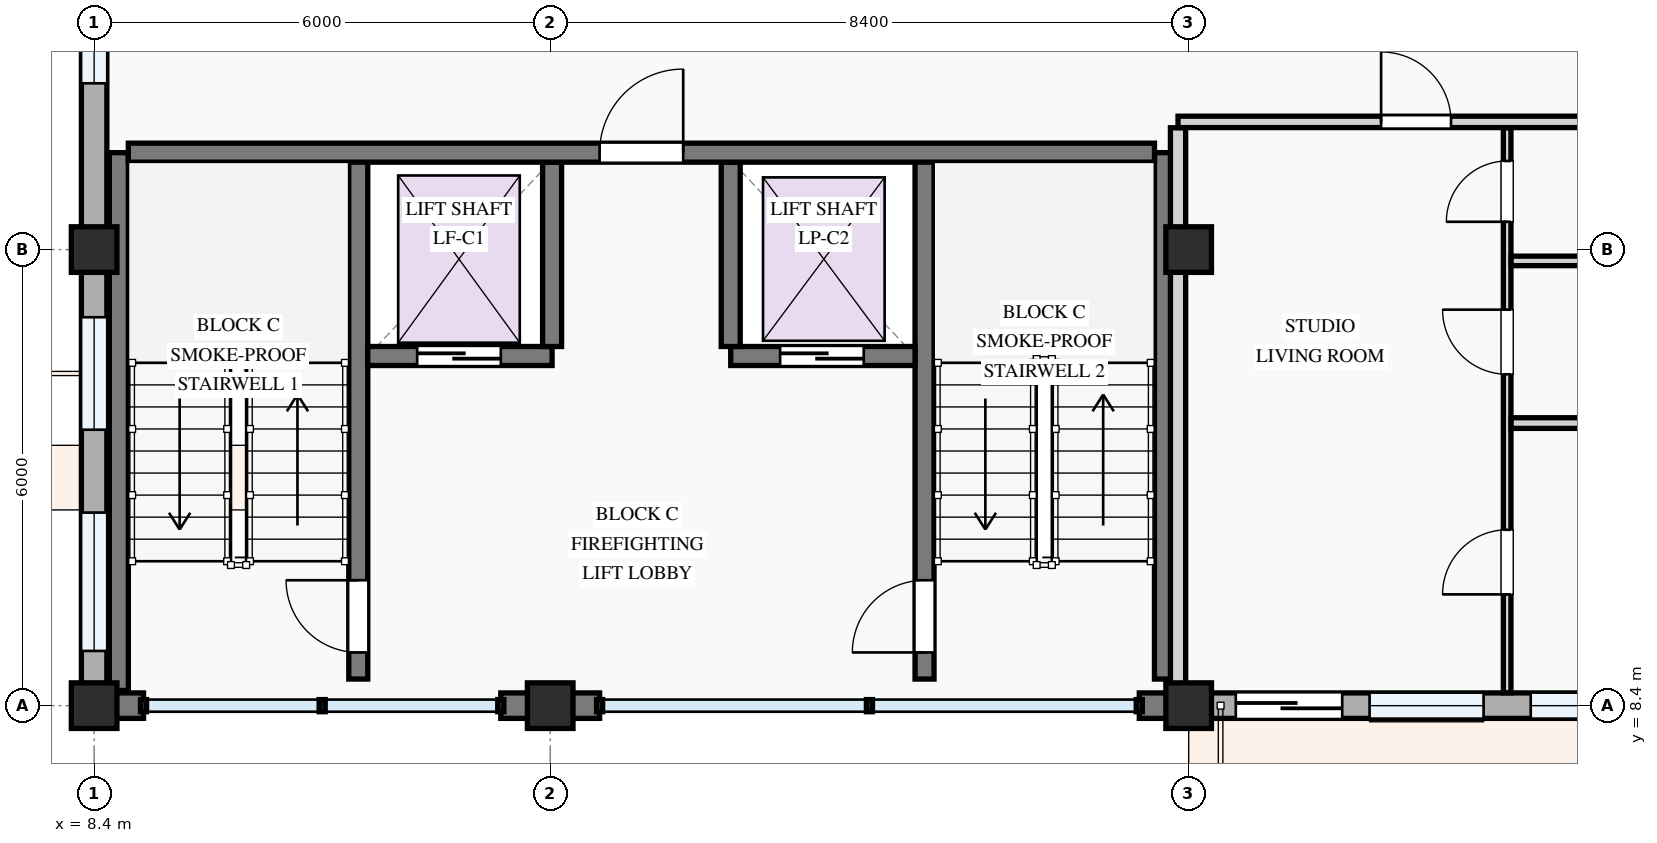
"""IFC4 building model, lengths in metres.
Left out: names, types, materials, properties, quantities, classifications, styles, units other than length and angle.
Written with IfcOpenShell. Run it as: python <this file> out.ifc"""

import sys

from ifc_helpers import new_model, si_unit, direction, frame, frame_2d, origin, origin_2d, place, context, subcontext, project, spatial, rectangle, extrude, element, fill, save


model = new_model("IFC4")
c1 = context("Model", 3, precision=1e-05, world=origin(), true_north=direction((0.0, 1.0)))
c2 = subcontext(c1, "Body", "Model", "MODEL_VIEW")
j1 = project(units=[si_unit("LENGTHUNIT", "METRE"), si_unit("PLANEANGLEUNIT", "RADIAN")], contexts=[c1])
p1 = place(None, origin())
s1 = spatial("IfcSite", under=j1, at=p1, CompositionType="ELEMENT")
p2 = place(p1, origin())
s2 = spatial("IfcBuilding", under=s1, at=p2, CompositionType="ELEMENT")
p3 = place(p2, frame((0.0, 0.0, 11.4)))
s3 = spatial("IfcBuildingStorey", under=s2, at=p3, CompositionType="ELEMENT", Elevation=11.4)
for number, where, z_axis, x_axis in (
    (1, (8.4, 8.4, 0.0), (0.0, 0.0, 1.0), (1.0, 0.0, 0.0)),
    (2, (8.4, 14.4, 0.0), (0.0, 0.0, 1.0), (1.0, 0.0, 0.0)),
    (3, (14.4, 8.4, 0.0), (0.0, 0.0, 1.0), (1.0, 0.0, 0.0)),
    (4, (22.8, 8.4, 0.0), (0.0, 0.0, 1.0), (1.0, 0.0, 0.0)),
    (5, (22.8, 14.4, 0.0), (0.0, 0.0, 1.0), (1.0, 0.0, 0.0)),
):
    element("IfcColumn", number, at=place(p3, frame(where, z_axis=z_axis, x_axis=x_axis)), inside=s3, PredefinedType="COLUMN", context=c2, shape_type="SweptSolid", body=[
        extrude(rectangle(XDim=0.6, YDim=0.6, at=origin_2d()), origin(), (0.0, 0.0, 1.0), 3.3),
    ])
p4 = place(p3, frame((8.4, 22.8, 0.0), z_axis=(0.0, 0.0, 1.0), x_axis=(0.0, -1.0, 0.0)))
e6 = element("IfcWall", 6, at=p4, inside=s3, PredefinedType="STANDARD", context=c2, shape_type="SweptSolid", body=[
    extrude(rectangle(XDim=8.4, YDim=0.335, at=frame_2d((4.2, 0.0))), origin(), (0.0, 0.0, 1.0), 2.425),
])
p5 = place(p4, frame((1.57, 0.0, 0.78)))
e7 = element("IfcOpeningElement", 7, at=p5, cuts=e6, PredefinedType="OPENING", context=c2, shape_type="SweptSolid", body=[
    extrude(rectangle(XDim=1.25, YDim=1.3, at=frame_2d((0.625, 0.65))), frame((0.0, 0.177, 0.0), z_axis=(0.0, -1.0, 0.0), x_axis=(1.0, 0.0, 0.0)), (0.0, 0.0, 1.0), 0.355),
])
p6 = place(p4, frame((5.113, 0.0, 0.78)))
e8 = element("IfcOpeningElement", 8, at=p6, cuts=e6, PredefinedType="OPENING", context=c2, shape_type="SweptSolid", body=[
    extrude(rectangle(XDim=1.1, YDim=1.3, at=frame_2d((0.55, 0.65))), frame((0.0, 0.177, 0.0), z_axis=(0.0, -1.0, 0.0), x_axis=(1.0, 0.0, 0.0)), (0.0, 0.0, 1.0), 0.355),
])
p7 = place(p3, frame((8.4, 14.4, 0.0), z_axis=(0.0, 0.0, 1.0), x_axis=(0.0, -1.0, 0.0)))
e9 = element("IfcWall", 9, at=p7, inside=s3, PredefinedType="STANDARD", context=c2, shape_type="SweptSolid", body=[
    extrude(rectangle(XDim=6.0, YDim=0.335, at=frame_2d((3.0, 0.0))), origin(), (0.0, 0.0, 1.0), 2.575),
])
p8 = place(p7, frame((0.89, 0.0, 0.78)))
e10 = element("IfcOpeningElement", 10, at=p8, cuts=e9, PredefinedType="OPENING", context=c2, shape_type="SweptSolid", body=[
    extrude(rectangle(XDim=1.48, YDim=1.52, at=frame_2d((0.74, 0.76))), frame((0.0, 0.177, 0.0), z_axis=(0.0, -1.0, 0.0), x_axis=(1.0, 0.0, 0.0)), (0.0, 0.0, 1.0), 0.355),
])
p9 = place(p7, frame((3.46, 0.0, 0.78)))
e11 = element("IfcOpeningElement", 11, at=p9, cuts=e9, PredefinedType="OPENING", context=c2, shape_type="SweptSolid", body=[
    extrude(rectangle(XDim=1.82, YDim=1.46, at=frame_2d((0.91, 0.73))), frame((0.0, 0.177, 0.0), z_axis=(0.0, -1.0, 0.0), x_axis=(1.0, 0.0, 0.0)), (0.0, 0.0, 1.0), 0.355),
])
p10 = place(p3, frame((8.57, 8.4, 0.0), z_axis=(0.0, 0.0, 1.0), x_axis=(1.0, 0.0, 0.0)))
e12 = element("IfcWall", 12, at=p10, inside=s3, PredefinedType="STANDARD", context=c2, shape_type="SweptSolid", body=[
    extrude(rectangle(XDim=0.48, YDim=0.335, at=frame_2d((0.24, 0.0))), origin(), (0.0, 0.0, 1.0), 3.04),
])
p11 = place(p3, frame((13.75, 8.4, 0.0), z_axis=(0.0, 0.0, 1.0), x_axis=(1.0, 0.0, 0.0)))
e13 = element("IfcWall", 13, at=p11, inside=s3, PredefinedType="STANDARD", context=c2, shape_type="SweptSolid", body=[
    extrude(rectangle(XDim=0.65, YDim=0.335, at=frame_2d((0.325, 0.0))), origin(), (0.0, 0.0, 1.0), 3.04),
])
for number, where, z_axis, x_axis in (
    (14, (14.4, 8.4, 0.0), (0.0, 0.0, 1.0), (1.0, 0.0, 0.0)),
    (15, (22.15, 8.4, 0.0), (0.0, 0.0, 1.0), (1.0, 0.0, 0.0)),
):
    element("IfcWall", number, at=place(p3, frame(where, z_axis=z_axis, x_axis=x_axis)), inside=s3, PredefinedType="STANDARD", context=c2, shape_type="SweptSolid", body=[
        extrude(rectangle(XDim=0.65, YDim=0.335, at=frame_2d((0.325, 0.0))), origin(), (0.0, 0.0, 1.0), 3.04),
    ])
p12 = place(p3, frame((22.8, 8.4, 0.0), z_axis=(0.0, 0.0, 1.0), x_axis=(1.0, 0.0, 0.0)))
e16 = element("IfcWall", 16, at=p12, inside=s3, PredefinedType="STANDARD", context=c2, shape_type="SweptSolid", body=[
    extrude(rectangle(XDim=6.0, YDim=0.335, at=frame_2d((3.0, 0.0))), origin(), (0.0, 0.0, 1.0), 2.475),
])
p13 = place(p12, frame((0.62, 0.0, 0.0)))
e17 = element("IfcOpeningElement", 17, at=p13, cuts=e16, PredefinedType="OPENING", context=c2, shape_type="SweptSolid", body=[
    extrude(rectangle(XDim=1.4, YDim=2.2, at=frame_2d((0.7, 1.1))), frame((0.0, 0.177, 0.0), z_axis=(0.0, -1.0, 0.0), x_axis=(1.0, 0.0, 0.0)), (0.0, 0.0, 1.0), 0.355),
])
p14 = place(p12, frame((2.38, 0.0, 0.78)))
e18 = element("IfcOpeningElement", 18, at=p14, cuts=e16, PredefinedType="OPENING", context=c2, shape_type="SweptSolid", body=[
    extrude(rectangle(XDim=1.5, YDim=1.5, at=frame_2d((0.75, 0.75))), frame((0.0, 0.177, 0.0), z_axis=(0.0, -1.0, 0.0), x_axis=(1.0, 0.0, 0.0)), (0.0, 0.0, 1.0), 0.355),
])
p15 = place(p12, frame((4.5, 0.0, 0.78)))
e19 = element("IfcOpeningElement", 19, at=p15, cuts=e16, PredefinedType="OPENING", context=c2, shape_type="SweptSolid", body=[
    extrude(rectangle(XDim=1.0, YDim=1.25, at=frame_2d((0.5, 0.625))), frame((0.0, 0.177, 0.0), z_axis=(0.0, -1.0, 0.0), x_axis=(1.0, 0.0, 0.0)), (0.0, 0.0, 1.0), 0.355),
])
p16 = place(p3, frame((11.875, 8.75, 0.0), z_axis=(0.0, 0.0, 1.0), x_axis=(0.0, 1.0, 0.0)))
e20 = element("IfcWall", 20, at=p16, inside=s3, PredefinedType="SHEAR", context=c2, shape_type="SweptSolid", body=[
    extrude(rectangle(XDim=6.925, YDim=0.25, at=frame_2d((3.462, 0.0))), origin(), (0.0, 0.0, 1.0), 3.0),
])
p17 = place(p16, frame((0.35, 0.0, 0.0)))
e21 = element("IfcOpeningElement", 21, at=p17, cuts=e20, PredefinedType="OPENING", context=c2, shape_type="SweptSolid", body=[
    extrude(rectangle(XDim=0.95, YDim=2.1, at=frame_2d((0.475, 1.05))), frame((0.0, 0.135, 0.0), z_axis=(0.0, -1.0, 0.0), x_axis=(1.0, 0.0, 0.0)), (0.0, 0.0, 1.0), 0.27),
])
p18 = place(p3, frame((8.725, 8.6, 0.0), z_axis=(0.0, 0.0, 1.0), x_axis=(0.0, 1.0, 0.0)))
e22 = element("IfcWall", 22, at=p18, inside=s3, PredefinedType="SHEAR", context=c2, shape_type="SweptSolid", body=[
    extrude(rectangle(XDim=7.075, YDim=0.25, at=frame_2d((3.538, 0.0))), origin(), (0.0, 0.0, 1.0), 3.0),
])
p19 = place(p3, frame((22.475, 8.75, 0.0), z_axis=(0.0, 0.0, 1.0), x_axis=(0.0, 1.0, 0.0)))
e23 = element("IfcWall", 23, at=p19, inside=s3, PredefinedType="SHEAR", context=c2, shape_type="SweptSolid", body=[
    extrude(rectangle(XDim=6.925, YDim=0.25, at=frame_2d((3.462, 0.0))), origin(), (0.0, 0.0, 1.0), 3.0),
])
p20 = place(p3, frame((19.325, 8.75, 0.0), z_axis=(0.0, 0.0, 1.0), x_axis=(0.0, 1.0, 0.0)))
e24 = element("IfcWall", 24, at=p20, inside=s3, PredefinedType="SHEAR", context=c2, shape_type="SweptSolid", body=[
    extrude(rectangle(XDim=6.925, YDim=0.25, at=frame_2d((3.462, 0.0))), origin(), (0.0, 0.0, 1.0), 3.0),
])
p21 = place(p20, frame((0.35, 0.0, 0.0)))
e25 = element("IfcOpeningElement", 25, at=p21, cuts=e24, PredefinedType="OPENING", context=c2, shape_type="SweptSolid", body=[
    extrude(rectangle(XDim=0.95, YDim=2.1, at=frame_2d((0.475, 1.05))), frame((0.0, 0.135, 0.0), z_axis=(0.0, -1.0, 0.0), x_axis=(1.0, 0.0, 0.0)), (0.0, 0.0, 1.0), 0.27),
])
p22 = place(p3, frame((12.0, 13.0, 0.0), z_axis=(0.0, 0.0, 1.0), x_axis=(1.0, 0.0, 0.0)))
e26 = element("IfcWall", 26, at=p22, inside=s3, PredefinedType="SHEAR", context=c2, shape_type="SweptSolid", body=[
    extrude(rectangle(XDim=2.425, YDim=0.25, at=frame_2d((1.212, 0.0))), origin(), (0.0, 0.0, 1.0), 3.0),
])
p23 = place(p22, frame((0.65, 0.0, 0.0)))
e27 = element("IfcOpeningElement", 27, at=p23, cuts=e26, PredefinedType="OPENING", context=c2, shape_type="SweptSolid", body=[
    extrude(rectangle(XDim=1.1, YDim=2.15, at=frame_2d((0.55, 1.075))), frame((0.0, 0.135, 0.0), z_axis=(0.0, -1.0, 0.0), x_axis=(1.0, 0.0, 0.0)), (0.0, 0.0, 1.0), 0.27),
])
p24 = place(p3, frame((16.775, 13.0, 0.0), z_axis=(0.0, 0.0, 1.0), x_axis=(1.0, 0.0, 0.0)))
e28 = element("IfcWall", 28, at=p24, inside=s3, PredefinedType="SHEAR", context=c2, shape_type="SweptSolid", body=[
    extrude(rectangle(XDim=2.425, YDim=0.25, at=frame_2d((1.212, 0.0))), origin(), (0.0, 0.0, 1.0), 3.0),
])
p25 = place(p24, frame((0.65, 0.0, 0.0)))
e29 = element("IfcOpeningElement", 29, at=p25, cuts=e28, PredefinedType="OPENING", context=c2, shape_type="SweptSolid", body=[
    extrude(rectangle(XDim=1.1, YDim=2.15, at=frame_2d((0.55, 1.075))), frame((0.0, 0.135, 0.0), z_axis=(0.0, -1.0, 0.0), x_axis=(1.0, 0.0, 0.0)), (0.0, 0.0, 1.0), 0.27),
])
for number, where, z_axis, x_axis in (
    (30, (14.425, 13.125, 0.0), (0.0, 0.0, 1.0), (0.0, 1.0, 0.0)),
    (31, (16.775, 13.125, 0.0), (0.0, 0.0, 1.0), (0.0, 1.0, 0.0)),
):
    element("IfcWall", number, at=place(p3, frame(where, z_axis=z_axis, x_axis=x_axis)), inside=s3, PredefinedType="SHEAR", context=c2, shape_type="SweptSolid", body=[
        extrude(rectangle(XDim=2.425, YDim=0.25, at=frame_2d((1.212, 0.0))), origin(), (0.0, 0.0, 1.0), 3.0),
    ])
p26 = place(p3, frame((8.85, 15.675, 0.0), z_axis=(0.0, 0.0, 1.0), x_axis=(1.0, 0.0, 0.0)))
e32 = element("IfcWall", 32, at=p26, inside=s3, PredefinedType="SHEAR", context=c2, shape_type="SweptSolid", body=[
    extrude(rectangle(XDim=13.5, YDim=0.25, at=frame_2d((6.75, 0.0))), origin(), (0.0, 0.0, 1.0), 3.0),
])
p27 = place(p26, frame((6.2, 0.0, 0.0)))
e33 = element("IfcOpeningElement", 33, at=p27, cuts=e32, PredefinedType="OPENING", context=c2, shape_type="SweptSolid", body=[
    extrude(rectangle(XDim=1.1, YDim=2.15, at=frame_2d((0.55, 1.075))), frame((0.0, 0.135, 0.0), z_axis=(0.0, -1.0, 0.0), x_axis=(1.0, 0.0, 0.0)), (0.0, 0.0, 1.0), 0.27),
])
p28 = place(p3, frame((26.99, 8.57, 0.0), z_axis=(0.0, 0.0, 1.0), x_axis=(0.0, 1.0, 0.0)))
e34 = element("IfcWall", 34, at=p28, inside=s3, PredefinedType="PARTITIONING", context=c2, shape_type="SweptSolid", body=[
    extrude(rectangle(XDim=7.433, YDim=0.1, at=frame_2d((3.717, 0.0))), origin(), (0.0, 0.0, 1.0), 3.0),
])
p29 = place(p28, frame((1.294, 0.0, 0.0)))
e35 = element("IfcOpeningElement", 35, at=p29, cuts=e34, PredefinedType="OPENING", context=c2, shape_type="SweptSolid", body=[
    extrude(rectangle(XDim=0.85, YDim=2.1, at=frame_2d((0.425, 1.05))), frame((0.0, 0.06, 0.0), z_axis=(0.0, -1.0, 0.0), x_axis=(1.0, 0.0, 0.0)), (0.0, 0.0, 1.0), 0.12),
])
p30 = place(p28, frame((4.19, 0.0, 0.0)))
e36 = element("IfcOpeningElement", 36, at=p30, cuts=e34, PredefinedType="OPENING", context=c2, shape_type="SweptSolid", body=[
    extrude(rectangle(XDim=0.85, YDim=2.1, at=frame_2d((0.425, 1.05))), frame((0.0, 0.06, 0.0), z_axis=(0.0, -1.0, 0.0), x_axis=(1.0, 0.0, 0.0)), (0.0, 0.0, 1.0), 0.12),
])
p31 = place(p28, frame((6.196, 0.0, 0.0)))
e37 = element("IfcOpeningElement", 37, at=p31, cuts=e34, PredefinedType="OPENING", context=c2, shape_type="SweptSolid", body=[
    extrude(rectangle(XDim=0.8, YDim=2.1, at=frame_2d((0.4, 1.05))), frame((0.0, 0.06, 0.0), z_axis=(0.0, -1.0, 0.0), x_axis=(1.0, 0.0, 0.0)), (0.0, 0.0, 1.0), 0.12),
])
p32 = place(p3, frame((27.042, 12.118, 0.0), z_axis=(0.0, 0.0, 1.0), x_axis=(1.0, 0.0, 0.0)))
e38 = element("IfcWall", 38, at=p32, inside=s3, PredefinedType="PARTITIONING", context=c2, shape_type="SweptSolid", body=[
    extrude(rectangle(XDim=7.384, YDim=0.14, at=frame_2d((3.692, 0.0))), origin(), (0.0, 0.0, 1.0), 3.0),
])
p33 = place(p3, frame((27.042, 14.251, 0.0), z_axis=(0.0, 0.0, 1.0), x_axis=(1.0, 0.0, 0.0)))
e39 = element("IfcWall", 39, at=p33, inside=s3, PredefinedType="PARTITIONING", context=c2, shape_type="SweptSolid", body=[
    extrude(rectangle(XDim=7.384, YDim=0.125, at=frame_2d((3.692, 0.0))), origin(), (0.0, 0.0, 1.0), 2.375),
])
p34 = place(p3, frame((22.66, 8.57, 0.0), z_axis=(0.0, 0.0, 1.0), x_axis=(0.0, 1.0, 0.0)))
e40 = element("IfcWall", 40, at=p34, inside=s3, PredefinedType="PARTITIONING", context=c2, shape_type="SweptSolid", body=[
    extrude(rectangle(XDim=7.433, YDim=0.2, at=frame_2d((3.717, 0.0))), origin(), (0.0, 0.0, 1.0), 2.425),
])
p35 = place(p3, frame((22.66, 16.08, 0.0), z_axis=(0.0, 0.0, 1.0), x_axis=(1.0, 0.0, 0.0)))
e41 = element("IfcWall", 41, at=p35, inside=s3, PredefinedType="PARTITIONING", context=c2, shape_type="SweptSolid", body=[
    extrude(rectangle(XDim=34.88, YDim=0.15, at=frame_2d((17.44, 0.0))), origin(), (0.0, 0.0, 1.0), 3.0),
])
p36 = place(p35, frame((2.672, 0.0, 0.0)))
e42 = element("IfcOpeningElement", 42, at=p36, cuts=e41, PredefinedType="OPENING", context=c2, shape_type="SweptSolid", body=[
    extrude(rectangle(XDim=0.92, YDim=2.1, at=frame_2d((0.46, 1.05))), frame((0.0, 0.085, 0.0), z_axis=(0.0, -1.0, 0.0), x_axis=(1.0, 0.0, 0.0)), (0.0, 0.0, 1.0), 0.17),
])
p37 = place(p35, frame((16.58, 0.0, 0.0)))
e43 = element("IfcOpeningElement", 43, at=p37, cuts=e41, PredefinedType="OPENING", context=c2, shape_type="SweptSolid", body=[
    extrude(rectangle(XDim=0.92, YDim=2.1, at=frame_2d((0.46, 1.05))), frame((0.0, 0.085, 0.0), z_axis=(0.0, -1.0, 0.0), x_axis=(1.0, 0.0, 0.0)), (0.0, 0.0, 1.0), 0.17),
])
p38 = place(p35, frame((24.315, 0.0, 0.0)))
e44 = element("IfcOpeningElement", 44, at=p38, cuts=e41, PredefinedType="OPENING", context=c2, shape_type="SweptSolid", body=[
    extrude(rectangle(XDim=0.92, YDim=2.1, at=frame_2d((0.46, 1.05))), frame((0.0, 0.085, 0.0), z_axis=(0.0, -1.0, 0.0), x_axis=(1.0, 0.0, 0.0)), (0.0, 0.0, 1.0), 0.17),
])
p39 = place(p6, origin())
e45 = element("IfcWindow", 45, at=p39, inside=s3, PartitioningType="SINGLE_PANEL", PredefinedType="WINDOW", context=c2, shape_type="SweptSolid", body=[
    extrude(rectangle(XDim=1.1, YDim=1.3, at=frame_2d((0.55, 0.65))), frame((0.0, 0.03, 0.0), z_axis=(0.0, -1.0, 0.0), x_axis=(1.0, 0.0, 0.0)), (0.0, 0.0, 1.0), 0.06),
])
fill(e8, e45)
p40 = place(p8, origin())
e46 = element("IfcWindow", 46, at=p40, inside=s3, PartitioningType="SINGLE_PANEL", PredefinedType="WINDOW", context=c2, shape_type="SweptSolid", body=[
    extrude(rectangle(XDim=1.48, YDim=1.52, at=frame_2d((0.74, 0.76))), frame((0.0, 0.03, 0.0), z_axis=(0.0, -1.0, 0.0), x_axis=(1.0, 0.0, 0.0)), (0.0, 0.0, 1.0), 0.06),
])
fill(e10, e46)
p41 = place(p9, origin())
e47 = element("IfcWindow", 47, at=p41, inside=s3, PartitioningType="DOUBLE_PANEL_VERTICAL", PredefinedType="WINDOW", context=c2, shape_type="SweptSolid", body=[
    extrude(rectangle(XDim=1.82, YDim=1.46, at=frame_2d((0.91, 0.73))), frame((0.0, 0.03, 0.0), z_axis=(0.0, -1.0, 0.0), x_axis=(1.0, 0.0, 0.0)), (0.0, 0.0, 1.0), 0.06),
])
fill(e11, e47)
p42 = place(p13, frame((1.4, 0.0, 0.0), z_axis=(0.0, 0.0, 1.0), x_axis=(-1.0, 0.0, 0.0)))
e48 = element("IfcDoor", 48, at=p42, inside=s3, OperationType="SLIDING_TO_LEFT", PredefinedType="DOOR", context=c2, shape_type="SweptSolid", body=[
    extrude(rectangle(XDim=1.4, YDim=2.2, at=frame_2d((0.7, 1.1))), frame((0.0, 0.025, 0.0), z_axis=(0.0, -1.0, 0.0), x_axis=(1.0, 0.0, 0.0)), (0.0, 0.0, 1.0), 0.05),
])
fill(e17, e48)
p43 = place(p14, origin())
e49 = element("IfcWindow", 49, at=p43, inside=s3, PartitioningType="SINGLE_PANEL", PredefinedType="WINDOW", context=c2, shape_type="SweptSolid", body=[
    extrude(rectangle(XDim=1.5, YDim=1.5, at=frame_2d((0.75, 0.75))), frame((0.0, 0.03, 0.0), z_axis=(0.0, -1.0, 0.0), x_axis=(1.0, 0.0, 0.0)), (0.0, 0.0, 1.0), 0.06),
])
fill(e18, e49)
p44 = place(p15, origin())
e50 = element("IfcWindow", 50, at=p44, inside=s3, PartitioningType="SINGLE_PANEL", PredefinedType="WINDOW", context=c2, shape_type="SweptSolid", body=[
    extrude(rectangle(XDim=1.0, YDim=1.25, at=frame_2d((0.5, 0.625))), frame((0.0, 0.03, 0.0), z_axis=(0.0, -1.0, 0.0), x_axis=(1.0, 0.0, 0.0)), (0.0, 0.0, 1.0), 0.06),
])
fill(e19, e50)
p45 = place(p17, origin())
e51 = element("IfcDoor", 51, at=p45, inside=s3, OperationType="SINGLE_SWING_RIGHT", PredefinedType="DOOR", context=c2, shape_type="SweptSolid", body=[
    extrude(rectangle(XDim=0.95, YDim=2.1, at=frame_2d((0.475, 1.05))), frame((0.0, 0.025, 0.0), z_axis=(0.0, -1.0, 0.0), x_axis=(1.0, 0.0, 0.0)), (0.0, 0.0, 1.0), 0.05),
])
fill(e21, e51)
p46 = place(p21, origin())
e52 = element("IfcDoor", 52, at=p46, inside=s3, OperationType="SINGLE_SWING_LEFT", PredefinedType="DOOR", context=c2, shape_type="SweptSolid", body=[
    extrude(rectangle(XDim=0.95, YDim=2.1, at=frame_2d((0.475, 1.05))), frame((0.0, 0.025, 0.0), z_axis=(0.0, -1.0, 0.0), x_axis=(1.0, 0.0, 0.0)), (0.0, 0.0, 1.0), 0.05),
])
fill(e25, e52)
p47 = place(p23, origin())
e53 = element("IfcDoor", 53, at=p47, inside=s3, OperationType="SLIDING_TO_LEFT", PredefinedType="DOOR", context=c2, shape_type="SweptSolid", body=[
    extrude(rectangle(XDim=1.1, YDim=2.15, at=frame_2d((0.55, 1.075))), frame((0.0, 0.025, 0.0), z_axis=(0.0, -1.0, 0.0), x_axis=(1.0, 0.0, 0.0)), (0.0, 0.0, 1.0), 0.05),
])
fill(e27, e53)
p48 = place(p25, origin())
e54 = element("IfcDoor", 54, at=p48, inside=s3, OperationType="SLIDING_TO_LEFT", PredefinedType="DOOR", context=c2, shape_type="SweptSolid", body=[
    extrude(rectangle(XDim=1.1, YDim=2.15, at=frame_2d((0.55, 1.075))), frame((0.0, 0.025, 0.0), z_axis=(0.0, -1.0, 0.0), x_axis=(1.0, 0.0, 0.0)), (0.0, 0.0, 1.0), 0.05),
])
fill(e29, e54)
p49 = place(p27, origin())
e55 = element("IfcDoor", 55, at=p49, inside=s3, OperationType="SINGLE_SWING_RIGHT", PredefinedType="DOOR", context=c2, shape_type="SweptSolid", body=[
    extrude(rectangle(XDim=1.1, YDim=2.15, at=frame_2d((0.55, 1.075))), frame((0.0, 0.025, 0.0), z_axis=(0.0, -1.0, 0.0), x_axis=(1.0, 0.0, 0.0)), (0.0, 0.0, 1.0), 0.05),
])
fill(e33, e55)
p50 = place(p29, origin())
e56 = element("IfcDoor", 56, at=p50, inside=s3, OperationType="SINGLE_SWING_LEFT", PredefinedType="DOOR", context=c2, shape_type="SweptSolid", body=[
    extrude(rectangle(XDim=0.85, YDim=2.1, at=frame_2d((0.425, 1.05))), frame((0.0, 0.025, 0.0), z_axis=(0.0, -1.0, 0.0), x_axis=(1.0, 0.0, 0.0)), (0.0, 0.0, 1.0), 0.05),
])
fill(e35, e56)
p51 = place(p30, origin())
e57 = element("IfcDoor", 57, at=p51, inside=s3, OperationType="SINGLE_SWING_RIGHT", PredefinedType="DOOR", context=c2, shape_type="SweptSolid", body=[
    extrude(rectangle(XDim=0.85, YDim=2.1, at=frame_2d((0.425, 1.05))), frame((0.0, 0.025, 0.0), z_axis=(0.0, -1.0, 0.0), x_axis=(1.0, 0.0, 0.0)), (0.0, 0.0, 1.0), 0.05),
])
fill(e36, e57)
p52 = place(p31, origin())
e58 = element("IfcDoor", 58, at=p52, inside=s3, OperationType="SINGLE_SWING_LEFT", PredefinedType="DOOR", context=c2, shape_type="SweptSolid", body=[
    extrude(rectangle(XDim=0.8, YDim=2.1, at=frame_2d((0.4, 1.05))), frame((0.0, 0.025, 0.0), z_axis=(0.0, -1.0, 0.0), x_axis=(1.0, 0.0, 0.0)), (0.0, 0.0, 1.0), 0.05),
])
fill(e37, e58)
p53 = place(p36, origin())
e59 = element("IfcDoor", 59, at=p53, inside=s3, OperationType="SINGLE_SWING_LEFT", PredefinedType="DOOR", context=c2, shape_type="SweptSolid", body=[
    extrude(rectangle(XDim=0.92, YDim=2.1, at=frame_2d((0.46, 1.05))), frame((0.0, 0.025, 0.0), z_axis=(0.0, -1.0, 0.0), x_axis=(1.0, 0.0, 0.0)), (0.0, 0.0, 1.0), 0.05),
])
fill(e42, e59)
save(model, sys.argv[1])
